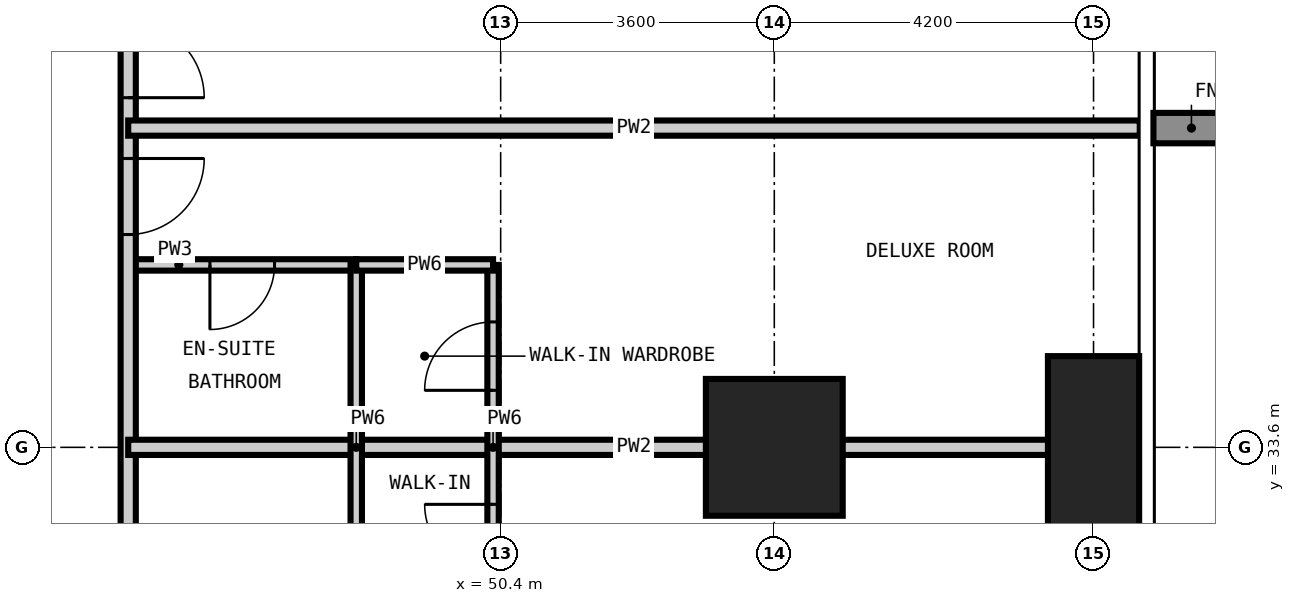
"""IFC4 building model, lengths in metres.
Left out: names, types, materials, properties, quantities, classifications, styles, units other than length and angle.
Written with IfcOpenShell. Run it as: python <this file> out.ifc"""

import sys

from ifc_helpers import new_model, si_unit, direction, frame, frame_2d, origin, origin_2d, place, context, subcontext, project, spatial, rectangle, extrude, element, fill, save


model = new_model("IFC4")
c1 = context("Model", 3, precision=1e-05, world=origin(), true_north=direction((0.0, 1.0)))
c2 = subcontext(c1, "Body", "Model", "MODEL_VIEW")
j1 = project(units=[si_unit("LENGTHUNIT", "METRE"), si_unit("PLANEANGLEUNIT", "RADIAN")], contexts=[c1])
p1 = place(None, origin())
s1 = spatial("IfcSite", under=j1, at=p1, CompositionType="ELEMENT")
p2 = place(p1, origin())
s2 = spatial("IfcBuilding", under=s1, at=p2, CompositionType="ELEMENT")
p3 = place(p2, frame((0.0, 0.0, 30.6)))
s3 = spatial("IfcBuildingStorey", under=s2, at=p3, CompositionType="ELEMENT", Elevation=30.6)
p4 = place(p3, frame((54.0, 33.6, -0.35), z_axis=(0.0, 0.0, 1.0), x_axis=(1.0, 0.0, 0.0)))
e1 = element("IfcColumn", 1, at=p4, inside=s3, PredefinedType="COLUMN", context=c2, shape_type="SweptSolid", body=[
    extrude(rectangle(XDim=1.8, YDim=1.8, at=origin_2d()), origin(), (0.0, 0.0, 1.0), 3.6),
])
p5 = place(p3, frame((58.2, 33.6, -0.35), z_axis=(0.0, 0.0, 1.0), x_axis=(1.0, 0.0, 0.0)))
e2 = element("IfcColumn", 2, at=p5, inside=s3, PredefinedType="COLUMN", context=c2, shape_type="SweptSolid", body=[
    extrude(rectangle(XDim=1.2, YDim=2.4, at=origin_2d()), origin(), (0.0, 0.0, 1.0), 3.6),
])
p6 = place(p3, frame((45.5, 36.0, 0.0), z_axis=(0.0, 0.0, 1.0), x_axis=(1.0, 0.0, 0.0)))
e3 = element("IfcWall", 3, at=p6, inside=s3, PredefinedType="PARTITIONING", context=c2, shape_type="SweptSolid", body=[
    extrude(rectangle(XDim=3.0, YDim=0.15, at=frame_2d((1.5, 0.0))), origin(), (0.0, 0.0, 1.0), 3.25),
])
p7 = place(p6, frame((1.075, 0.0, 0.0)))
e4 = element("IfcOpeningElement", 4, at=p7, cuts=e3, PredefinedType="OPENING", context=c2, shape_type="SweptSolid", body=[
    extrude(rectangle(XDim=0.85, YDim=2.1, at=frame_2d((0.425, 1.05))), frame((0.0, 0.085, 0.0), z_axis=(0.0, -1.0, 0.0), x_axis=(1.0, 0.0, 0.0)), (0.0, 0.0, 1.0), 0.17),
])
p8 = place(p3, frame((45.5, 45.8, 0.0), z_axis=(0.0, 0.0, 1.0), x_axis=(0.0, -1.0, 0.0)))
e5 = element("IfcWall", 5, at=p8, inside=s3, PredefinedType="PARTITIONING", context=c2, shape_type="SweptSolid", body=[
    extrude(rectangle(XDim=32.2, YDim=0.2, at=frame_2d((16.1, 0.0))), origin(), (0.0, 0.0, 1.0), 3.25),
])
p9 = place(p8, frame((26.4, 0.0, 0.0)))
e6 = element("IfcOpeningElement", 6, at=p9, cuts=e5, PredefinedType="OPENING", context=c2, shape_type="SweptSolid", body=[
    extrude(rectangle(XDim=1.0, YDim=2.2, at=frame_2d((0.5, 1.1))), frame((0.0, 0.11, 0.0), z_axis=(0.0, -1.0, 0.0), x_axis=(1.0, 0.0, 0.0)), (0.0, 0.0, 1.0), 0.22),
])
p10 = place(p8, frame((22.2, 0.0, 0.0)))
e7 = element("IfcOpeningElement", 7, at=p10, cuts=e5, PredefinedType="OPENING", context=c2, shape_type="SweptSolid", body=[
    extrude(rectangle(XDim=1.0, YDim=2.2, at=frame_2d((0.5, 1.1))), frame((0.0, 0.11, 0.0), z_axis=(0.0, -1.0, 0.0), x_axis=(1.0, 0.0, 0.0)), (0.0, 0.0, 1.0), 0.22),
])
p11 = place(p8, frame((16.8, 0.0, 0.0)))
e8 = element("IfcOpeningElement", 8, at=p11, cuts=e5, PredefinedType="OPENING", context=c2, shape_type="SweptSolid", body=[
    extrude(rectangle(XDim=1.0, YDim=2.2, at=frame_2d((0.5, 1.1))), frame((0.0, 0.11, 0.0), z_axis=(0.0, -1.0, 0.0), x_axis=(1.0, 0.0, 0.0)), (0.0, 0.0, 1.0), 0.22),
])
p12 = place(p8, frame((15.0, 0.0, 0.0)))
e9 = element("IfcOpeningElement", 9, at=p12, cuts=e5, PredefinedType="OPENING", context=c2, shape_type="SweptSolid", body=[
    extrude(rectangle(XDim=1.0, YDim=2.2, at=frame_2d((0.5, 1.1))), frame((0.0, 0.11, 0.0), z_axis=(0.0, -1.0, 0.0), x_axis=(1.0, 0.0, 0.0)), (0.0, 0.0, 1.0), 0.22),
])
p13 = place(p8, frame((8.4, 0.0, 0.0)))
e10 = element("IfcOpeningElement", 10, at=p13, cuts=e5, PredefinedType="OPENING", context=c2, shape_type="SweptSolid", body=[
    extrude(rectangle(XDim=1.0, YDim=2.2, at=frame_2d((0.5, 1.1))), frame((0.0, 0.11, 0.0), z_axis=(0.0, -1.0, 0.0), x_axis=(1.0, 0.0, 0.0)), (0.0, 0.0, 1.0), 0.22),
])
p14 = place(p8, frame((6.6, 0.0, 0.0)))
e11 = element("IfcOpeningElement", 11, at=p14, cuts=e5, PredefinedType="OPENING", context=c2, shape_type="SweptSolid", body=[
    extrude(rectangle(XDim=1.0, YDim=2.2, at=frame_2d((0.5, 1.1))), frame((0.0, 0.11, 0.0), z_axis=(0.0, -1.0, 0.0), x_axis=(1.0, 0.0, 0.0)), (0.0, 0.0, 1.0), 0.22),
])
p15 = place(p8, frame((30.1, 0.0, 0.0)))
e12 = element("IfcOpeningElement", 12, at=p15, cuts=e5, PredefinedType="OPENING", context=c2, shape_type="SweptSolid", body=[
    extrude(rectangle(XDim=1.0, YDim=2.2, at=frame_2d((0.5, 1.1))), frame((0.0, 0.11, 0.0), z_axis=(0.0, -1.0, 0.0), x_axis=(1.0, 0.0, 0.0)), (0.0, 0.0, 1.0), 0.22),
])
p16 = place(p8, frame((1.4, 0.0, 0.0)))
e13 = element("IfcOpeningElement", 13, at=p16, cuts=e5, PredefinedType="OPENING", context=c2, shape_type="SweptSolid", body=[
    extrude(rectangle(XDim=1.0, YDim=2.2, at=frame_2d((0.5, 1.1))), frame((0.0, 0.11, 0.0), z_axis=(0.0, -1.0, 0.0), x_axis=(1.0, 0.0, 0.0)), (0.0, 0.0, 1.0), 0.22),
])
for number, where, z_axis, x_axis in (
    (14, (45.5, 33.6, 0.0), (0.0, 0.0, 1.0), (1.0, 0.0, 0.0)),
    (15, (45.5, 37.8, 0.0), (0.0, 0.0, 1.0), (1.0, 0.0, 0.0)),
):
    element("IfcWall", number, at=place(p3, frame(where, z_axis=z_axis, x_axis=x_axis)), inside=s3, PredefinedType="PARTITIONING", context=c2, shape_type="SweptSolid", body=[
        extrude(rectangle(XDim=13.308, YDim=0.2, at=frame_2d((6.654, 0.0))), origin(), (0.0, 0.0, 1.0), 3.25),
    ])
p17 = place(p3, frame((48.5, 31.2, 0.0), z_axis=(0.0, 0.0, 1.0), x_axis=(0.0, 1.0, 0.0)))
e16 = element("IfcWall", 16, at=p17, inside=s3, PredefinedType="PARTITIONING", context=c2, shape_type="SweptSolid", body=[
    extrude(rectangle(XDim=4.8, YDim=0.15, at=frame_2d((2.4, 0.0))), origin(), (0.0, 0.0, 1.0), 3.25),
])
p18 = place(p3, frame((50.3, 31.2, 0.0), z_axis=(0.0, 0.0, 1.0), x_axis=(0.0, 1.0, 0.0)))
e17 = element("IfcWall", 17, at=p18, inside=s3, PredefinedType="PARTITIONING", context=c2, shape_type="SweptSolid", body=[
    extrude(rectangle(XDim=4.8, YDim=0.15, at=frame_2d((2.4, 0.0))), origin(), (0.0, 0.0, 1.0), 3.25),
])
p19 = place(p18, frame((0.75, 0.0, 0.0)))
e18 = element("IfcOpeningElement", 18, at=p19, cuts=e17, PredefinedType="OPENING", context=c2, shape_type="SweptSolid", body=[
    extrude(rectangle(XDim=0.9, YDim=2.1, at=frame_2d((0.45, 1.05))), frame((0.0, 0.085, 0.0), z_axis=(0.0, -1.0, 0.0), x_axis=(1.0, 0.0, 0.0)), (0.0, 0.0, 1.0), 0.17),
])
p20 = place(p18, frame((3.15, 0.0, 0.0)))
e19 = element("IfcOpeningElement", 19, at=p20, cuts=e17, PredefinedType="OPENING", context=c2, shape_type="SweptSolid", body=[
    extrude(rectangle(XDim=0.9, YDim=2.1, at=frame_2d((0.45, 1.05))), frame((0.0, 0.085, 0.0), z_axis=(0.0, -1.0, 0.0), x_axis=(1.0, 0.0, 0.0)), (0.0, 0.0, 1.0), 0.17),
])
p21 = place(p3, frame((48.5, 36.0, 0.0), z_axis=(0.0, 0.0, 1.0), x_axis=(1.0, 0.0, 0.0)))
e20 = element("IfcWall", 20, at=p21, inside=s3, PredefinedType="PARTITIONING", context=c2, shape_type="SweptSolid", body=[
    extrude(rectangle(XDim=1.8, YDim=0.15, at=frame_2d((0.9, 0.0))), origin(), (0.0, 0.0, 1.0), 3.25),
])
p22 = place(p19, origin())
e21 = element("IfcDoor", 21, at=p22, inside=s3, OperationType="SINGLE_SWING_RIGHT", PredefinedType="DOOR", context=c2, shape_type="SweptSolid", body=[
    extrude(rectangle(XDim=0.9, YDim=2.1, at=frame_2d((0.45, 1.05))), frame((0.0, 0.025, 0.0), z_axis=(0.0, -1.0, 0.0), x_axis=(1.0, 0.0, 0.0)), (0.0, 0.0, 1.0), 0.05),
])
fill(e18, e21)
p23 = place(p13, origin())
e22 = element("IfcDoor", 22, at=p23, inside=s3, OperationType="SINGLE_SWING_LEFT", PredefinedType="DOOR", context=c2, shape_type="SweptSolid", body=[
    extrude(rectangle(XDim=1.0, YDim=2.2, at=frame_2d((0.5, 1.1))), frame((0.0, 0.025, 0.0), z_axis=(0.0, -1.0, 0.0), x_axis=(1.0, 0.0, 0.0)), (0.0, 0.0, 1.0), 0.05),
])
fill(e10, e22)
p24 = place(p7, frame((0.85, 0.0, 0.0), z_axis=(0.0, 0.0, 1.0), x_axis=(-1.0, 0.0, 0.0)))
e23 = element("IfcDoor", 23, at=p24, inside=s3, OperationType="SINGLE_SWING_RIGHT", PredefinedType="DOOR", context=c2, shape_type="SweptSolid", body=[
    extrude(rectangle(XDim=0.85, YDim=2.1, at=frame_2d((0.425, 1.05))), frame((0.0, 0.025, 0.0), z_axis=(0.0, -1.0, 0.0), x_axis=(1.0, 0.0, 0.0)), (0.0, 0.0, 1.0), 0.05),
])
fill(e4, e23)
p25 = place(p20, origin())
e24 = element("IfcDoor", 24, at=p25, inside=s3, OperationType="SINGLE_SWING_LEFT", PredefinedType="DOOR", context=c2, shape_type="SweptSolid", body=[
    extrude(rectangle(XDim=0.9, YDim=2.1, at=frame_2d((0.45, 1.05))), frame((0.0, 0.025, 0.0), z_axis=(0.0, -1.0, 0.0), x_axis=(1.0, 0.0, 0.0)), (0.0, 0.0, 1.0), 0.05),
])
fill(e19, e24)
p26 = place(p14, origin())
e25 = element("IfcDoor", 25, at=p26, inside=s3, OperationType="SINGLE_SWING_RIGHT", PredefinedType="DOOR", context=c2, shape_type="SweptSolid", body=[
    extrude(rectangle(XDim=1.0, YDim=2.2, at=frame_2d((0.5, 1.1))), frame((0.0, 0.025, 0.0), z_axis=(0.0, -1.0, 0.0), x_axis=(1.0, 0.0, 0.0)), (0.0, 0.0, 1.0), 0.05),
])
fill(e11, e25)
save(model, sys.argv[1])
